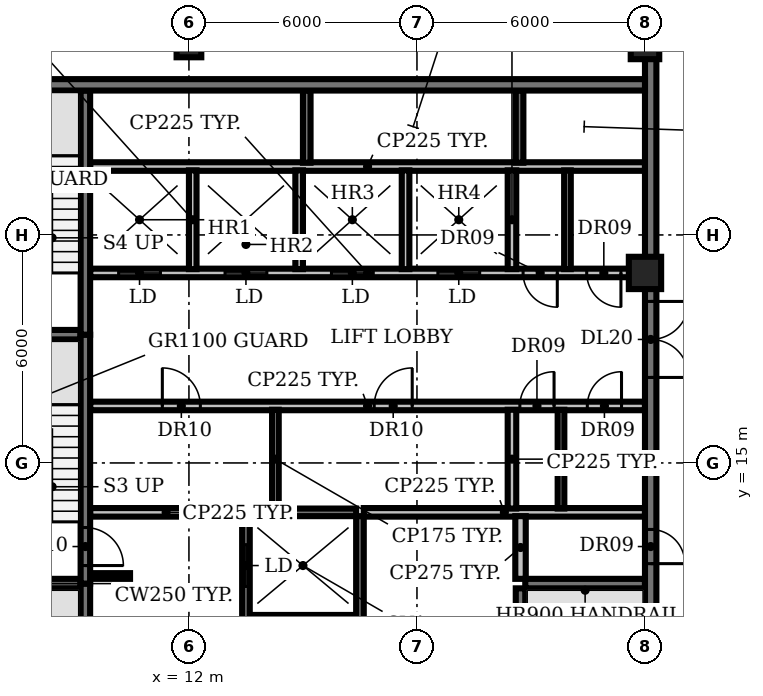
"""IFC4 building model, lengths in metres.
Left out: names, types, materials, properties, quantities, classifications, styles, units other than length and angle.
Written with IfcOpenShell. Run it as: python <this file> out.ifc"""

import sys

from ifc_helpers import new_model, si_unit, direction, frame, frame_2d, origin, origin_2d, place, context, subcontext, project, spatial, rectangle, circle, extrude, element, fill, save


model = new_model("IFC4")
c1 = context("Model", 3, precision=1e-05, world=origin(), true_north=direction((0.0, 1.0)))
c2 = subcontext(c1, "Body", "Model", "MODEL_VIEW")
j1 = project(units=[si_unit("LENGTHUNIT", "METRE"), si_unit("PLANEANGLEUNIT", "RADIAN")], contexts=[c1])
p1 = place(None, origin())
s1 = spatial("IfcSite", under=j1, at=p1, CompositionType="ELEMENT")
p2 = place(p1, origin())
s2 = spatial("IfcBuilding", under=s1, at=p2, CompositionType="ELEMENT")
p3 = place(p2, frame((0.0, 0.0, 297.8)))
s3 = spatial("IfcBuildingStorey", under=s2, at=p3, CompositionType="ELEMENT", Elevation=297.8)
p4 = place(p3, frame((12.0, 26.0, 0.0), z_axis=(0.0, 0.0, 1.0), x_axis=(1.0, 0.0, 0.0)))
e1 = element("IfcColumn", 1, at=p4, inside=s3, PredefinedType="COLUMN", context=c2, shape_type="SweptSolid", body=[
    extrude(rectangle(XDim=0.65, YDim=0.65, at=origin_2d()), origin(), (0.0, 0.0, 1.0), 3.85),
])
p5 = place(p3, frame((24.0, 20.0, 0.0), z_axis=(0.0, 0.0, 1.0), x_axis=(1.0, 0.0, 0.0)))
e2 = element("IfcColumn", 2, at=p5, inside=s3, PredefinedType="COLUMN", context=c2, shape_type="SweptSolid", body=[
    extrude(circle(Radius=0.425, at=origin_2d()), origin(), (0.0, 0.0, 1.0), 3.85),
])
p6 = place(p3, frame((24.0, 26.0, 0.0), z_axis=(0.0, 0.0, 1.0), x_axis=(1.0, 0.0, 0.0)))
e3 = element("IfcColumn", 3, at=p6, inside=s3, PredefinedType="COLUMN", context=c2, shape_type="SweptSolid", body=[
    extrude(rectangle(XDim=0.75, YDim=0.75, at=origin_2d()), origin(), (0.0, 0.0, 1.0), 3.85),
])
p7 = place(p3, frame((13.6, 10.9, 0.0), z_axis=(0.0, 0.0, 1.0), x_axis=(1.0, 0.0, 0.0)))
e4 = element("IfcWall", 4, at=p7, inside=s3, PredefinedType="SHEAR", context=c2, shape_type="SweptSolid", body=[
    extrude(rectangle(XDim=2.8, YDim=0.2, at=frame_2d((1.4, 0.0))), origin(), (0.0, 0.0, 1.0), 3.85),
])
for number, where, z_axis, x_axis in (
    (5, (6.0, 11.825, 0.0), (0.0, 0.0, 1.0), (1.0, 0.0, 0.0)),
    (6, (20.85, 11.825, 0.0), (0.0, 0.0, 1.0), (1.0, 0.0, 0.0)),
):
    element("IfcWall", number, at=place(p3, frame(where, z_axis=z_axis, x_axis=x_axis)), inside=s3, PredefinedType="SHEAR", context=c2, shape_type="SweptSolid", body=[
        extrude(rectangle(XDim=3.15, YDim=0.25, at=frame_2d((1.575, 0.0))), origin(), (0.0, 0.0, 1.0), 3.85),
    ])
p8 = place(p3, frame((9.4, 12.025, 0.0), z_axis=(0.0, 0.0, 1.0), x_axis=(1.0, 0.0, 0.0)))
e7 = element("IfcWall", 7, at=p8, inside=s3, PredefinedType="SHEAR", context=c2, shape_type="SweptSolid", body=[
    extrude(rectangle(XDim=1.05, YDim=0.15, at=frame_2d((0.525, 0.0))), origin(), (0.0, 0.0, 1.0), 3.85),
])
p9 = place(p3, frame((9.4, 13.7, 0.0), z_axis=(0.0, 0.0, 1.0), x_axis=(1.0, 0.0, 0.0)))
e8 = element("IfcWall", 8, at=p9, inside=s3, PredefinedType="PARTITIONING", context=c2, shape_type="SweptSolid", body=[
    extrude(rectangle(XDim=4.0, YDim=0.225, at=frame_2d((2.0, 0.0))), origin(), (0.0, 0.0, 1.0), 3.85),
])
p10 = place(p3, frame((13.6, 13.7, 0.0), z_axis=(0.0, 0.0, 1.0), x_axis=(1.0, 0.0, 0.0)))
e9 = element("IfcWall", 9, at=p10, inside=s3, PredefinedType="SHEAR", context=c2, shape_type="SweptSolid", body=[
    extrude(rectangle(XDim=2.8, YDim=0.2, at=frame_2d((1.4, 0.0))), origin(), (0.0, 0.0, 1.0), 3.85),
])
p11 = place(p3, frame((16.6, 13.7, 0.0), z_axis=(0.0, 0.0, 1.0), x_axis=(1.0, 0.0, 0.0)))
e10 = element("IfcWall", 10, at=p11, inside=s3, PredefinedType="PARTITIONING", context=c2, shape_type="SweptSolid", body=[
    extrude(rectangle(XDim=7.4, YDim=0.225, at=frame_2d((3.7, 0.0))), origin(), (0.0, 0.0, 1.0), 3.85),
])
p12 = place(p3, frame((9.4, 16.5, 0.0), z_axis=(0.0, 0.0, 1.0), x_axis=(1.0, 0.0, 0.0)))
e11 = element("IfcWall", 11, at=p12, inside=s3, PredefinedType="PARTITIONING", context=c2, shape_type="SweptSolid", body=[
    extrude(rectangle(XDim=14.6, YDim=0.225, at=frame_2d((7.3, 0.0))), origin(), (0.0, 0.0, 1.0), 3.85),
])
p13 = place(p12, frame((1.9, 0.0, 0.0)))
e12 = element("IfcOpeningElement", 12, at=p13, cuts=e11, PredefinedType="OPENING", context=c2, shape_type="SweptSolid", body=[
    extrude(rectangle(XDim=1.0, YDim=2.1, at=frame_2d((0.5, 1.05))), frame((0.0, 0.123, 0.0), z_axis=(0.0, -1.0, 0.0), x_axis=(1.0, 0.0, 0.0)), (0.0, 0.0, 1.0), 0.245),
])
p14 = place(p12, frame((7.475, 0.0, 0.0)))
e13 = element("IfcOpeningElement", 13, at=p14, cuts=e11, PredefinedType="OPENING", context=c2, shape_type="SweptSolid", body=[
    extrude(rectangle(XDim=1.0, YDim=2.1, at=frame_2d((0.5, 1.05))), frame((0.0, 0.123, 0.0), z_axis=(0.0, -1.0, 0.0), x_axis=(1.0, 0.0, 0.0)), (0.0, 0.0, 1.0), 0.245),
])
p15 = place(p12, frame((11.308, 0.0, 0.0)))
e14 = element("IfcOpeningElement", 14, at=p15, cuts=e11, PredefinedType="OPENING", context=c2, shape_type="SweptSolid", body=[
    extrude(rectangle(XDim=0.9, YDim=2.1, at=frame_2d((0.45, 1.05))), frame((0.0, 0.123, 0.0), z_axis=(0.0, -1.0, 0.0), x_axis=(1.0, 0.0, 0.0)), (0.0, 0.0, 1.0), 0.245),
])
p16 = place(p12, frame((13.083, 0.0, 0.0)))
e15 = element("IfcOpeningElement", 15, at=p16, cuts=e11, PredefinedType="OPENING", context=c2, shape_type="SweptSolid", body=[
    extrude(rectangle(XDim=0.9, YDim=2.1, at=frame_2d((0.45, 1.05))), frame((0.0, 0.123, 0.0), z_axis=(0.0, -1.0, 0.0), x_axis=(1.0, 0.0, 0.0)), (0.0, 0.0, 1.0), 0.245),
])
p17 = place(p3, frame((6.0, 18.375, 0.0), z_axis=(0.0, 0.0, 1.0), x_axis=(1.0, 0.0, 0.0)))
e16 = element("IfcWall", 16, at=p17, inside=s3, PredefinedType="SHEAR", context=c2, shape_type="SweptSolid", body=[
    extrude(rectangle(XDim=3.15, YDim=0.25, at=frame_2d((1.575, 0.0))), origin(), (0.0, 0.0, 1.0), 3.85),
])
p18 = place(p3, frame((24.0, 20.0, 0.0), z_axis=(0.0, 0.0, 1.0), x_axis=(-1.0, 0.0, 0.0)))
e17 = element("IfcWall", 17, at=p18, inside=s3, PredefinedType="PARTITIONING", context=c2, shape_type="SweptSolid", body=[
    extrude(rectangle(XDim=14.6, YDim=0.225, at=frame_2d((7.3, 0.0))), origin(), (0.0, 0.0, 1.0), 3.85),
])
p19 = place(p18, frame((12.75, 0.0, 0.0)))
e18 = element("IfcOpeningElement", 18, at=p19, cuts=e17, PredefinedType="OPENING", context=c2, shape_type="SweptSolid", body=[
    extrude(rectangle(XDim=1.1, YDim=2.1, at=frame_2d((0.55, 1.05))), frame((0.0, 0.123, 0.0), z_axis=(0.0, -1.0, 0.0), x_axis=(1.0, 0.0, 0.0)), (0.0, 0.0, 1.0), 0.245),
])
p20 = place(p18, frame((9.95, 0.0, 0.0)))
e19 = element("IfcOpeningElement", 19, at=p20, cuts=e17, PredefinedType="OPENING", context=c2, shape_type="SweptSolid", body=[
    extrude(rectangle(XDim=1.1, YDim=2.1, at=frame_2d((0.55, 1.05))), frame((0.0, 0.123, 0.0), z_axis=(0.0, -1.0, 0.0), x_axis=(1.0, 0.0, 0.0)), (0.0, 0.0, 1.0), 0.245),
])
p21 = place(p18, frame((7.15, 0.0, 0.0)))
e20 = element("IfcOpeningElement", 20, at=p21, cuts=e17, PredefinedType="OPENING", context=c2, shape_type="SweptSolid", body=[
    extrude(rectangle(XDim=1.1, YDim=2.1, at=frame_2d((0.55, 1.05))), frame((0.0, 0.123, 0.0), z_axis=(0.0, -1.0, 0.0), x_axis=(1.0, 0.0, 0.0)), (0.0, 0.0, 1.0), 0.245),
])
p22 = place(p18, frame((4.35, 0.0, 0.0)))
e21 = element("IfcOpeningElement", 21, at=p22, cuts=e17, PredefinedType="OPENING", context=c2, shape_type="SweptSolid", body=[
    extrude(rectangle(XDim=1.1, YDim=2.1, at=frame_2d((0.55, 1.05))), frame((0.0, 0.123, 0.0), z_axis=(0.0, -1.0, 0.0), x_axis=(1.0, 0.0, 0.0)), (0.0, 0.0, 1.0), 0.245),
])
p23 = place(p18, frame((2.308, 0.0, 0.0)))
e22 = element("IfcOpeningElement", 22, at=p23, cuts=e17, PredefinedType="OPENING", context=c2, shape_type="SweptSolid", body=[
    extrude(rectangle(XDim=0.9, YDim=2.1, at=frame_2d((0.45, 1.05))), frame((0.0, 0.123, 0.0), z_axis=(0.0, -1.0, 0.0), x_axis=(1.0, 0.0, 0.0)), (0.0, 0.0, 1.0), 0.245),
])
p24 = place(p18, frame((0.633, 0.0, 0.0)))
e23 = element("IfcOpeningElement", 23, at=p24, cuts=e17, PredefinedType="OPENING", context=c2, shape_type="SweptSolid", body=[
    extrude(rectangle(XDim=0.9, YDim=2.1, at=frame_2d((0.45, 1.05))), frame((0.0, 0.123, 0.0), z_axis=(0.0, -1.0, 0.0), x_axis=(1.0, 0.0, 0.0)), (0.0, 0.0, 1.0), 0.245),
])
p25 = place(p3, frame((9.4, 22.8, 0.0), z_axis=(0.0, 0.0, 1.0), x_axis=(1.0, 0.0, 0.0)))
e24 = element("IfcWall", 24, at=p25, inside=s3, PredefinedType="PARTITIONING", context=c2, shape_type="SweptSolid", body=[
    extrude(rectangle(XDim=14.6, YDim=0.225, at=frame_2d((7.3, 0.0))), origin(), (0.0, 0.0, 1.0), 3.85),
])
p26 = place(p3, frame((9.275, 11.825, 0.0), z_axis=(0.0, 0.0, 1.0), x_axis=(0.0, -1.0, 0.0)))
e25 = element("IfcWall", 25, at=p26, inside=s3, PredefinedType="SHEAR", context=c2, shape_type="SweptSolid", body=[
    extrude(rectangle(XDim=6.425, YDim=0.25, at=frame_2d((3.212, 0.0))), origin(), (0.0, 0.0, 1.0), 3.85),
])
p27 = place(p26, frame((5.075, 0.0, 0.0)))
e26 = element("IfcOpeningElement", 26, at=p27, cuts=e25, PredefinedType="OPENING", context=c2, shape_type="SweptSolid", body=[
    extrude(rectangle(XDim=1.0, YDim=2.1, at=frame_2d((0.5, 1.05))), frame((0.0, 0.135, 0.0), z_axis=(0.0, -1.0, 0.0), x_axis=(1.0, 0.0, 0.0)), (0.0, 0.0, 1.0), 0.27),
])
p28 = place(p3, frame((9.275, 18.375, 0.0), z_axis=(0.0, 0.0, 1.0), x_axis=(0.0, -1.0, 0.0)))
e27 = element("IfcWall", 27, at=p28, inside=s3, PredefinedType="SHEAR", context=c2, shape_type="SweptSolid", body=[
    extrude(rectangle(XDim=6.55, YDim=0.25, at=frame_2d((3.275, 0.0))), origin(), (0.0, 0.0, 1.0), 3.85),
])
p29 = place(p28, frame((5.075, 0.0, 0.0)))
e28 = element("IfcOpeningElement", 28, at=p29, cuts=e27, PredefinedType="OPENING", context=c2, shape_type="SweptSolid", body=[
    extrude(rectangle(XDim=1.0, YDim=2.1, at=frame_2d((0.5, 1.05))), frame((0.0, 0.135, 0.0), z_axis=(0.0, -1.0, 0.0), x_axis=(1.0, 0.0, 0.0)), (0.0, 0.0, 1.0), 0.27),
])
p30 = place(p3, frame((9.275, 18.375, 0.0), z_axis=(0.0, 0.0, 1.0), x_axis=(0.0, 1.0, 0.0)))
e29 = element("IfcWall", 29, at=p30, inside=s3, PredefinedType="SHEAR", context=c2, shape_type="SweptSolid", body=[
    extrude(rectangle(XDim=6.425, YDim=0.25, at=frame_2d((3.212, 0.0))), origin(), (0.0, 0.0, 1.0), 3.85),
])
p31 = place(p3, frame((12.1, 20.1, 0.0), z_axis=(0.0, 0.0, 1.0), x_axis=(0.0, 1.0, 0.0)))
e30 = element("IfcWall", 30, at=p31, inside=s3, PredefinedType="SOLIDWALL", context=c2, shape_type="SweptSolid", body=[
    extrude(rectangle(XDim=2.6, YDim=0.2, at=frame_2d((1.3, 0.0))), origin(), (0.0, 0.0, 1.0), 3.85),
])
p32 = place(p3, frame((13.5, 5.4, 0.0), z_axis=(0.0, 0.0, 1.0), x_axis=(0.0, 1.0, 0.0)))
e31 = element("IfcWall", 31, at=p32, inside=s3, PredefinedType="SHEAR", context=c2, shape_type="SweptSolid", body=[
    extrude(rectangle(XDim=8.2, YDim=0.2, at=frame_2d((4.1, 0.0))), origin(), (0.0, 0.0, 1.0), 3.85),
])
p33 = place(p32, frame((0.75, 0.0, 0.0)))
e32 = element("IfcOpeningElement", 32, at=p33, cuts=e31, PredefinedType="OPENING", context=c2, shape_type="SweptSolid", body=[
    extrude(rectangle(XDim=1.1, YDim=2.1, at=frame_2d((0.55, 1.05))), frame((0.0, 0.11, 0.0), z_axis=(0.0, -1.0, 0.0), x_axis=(1.0, 0.0, 0.0)), (0.0, 0.0, 1.0), 0.22),
])
p34 = place(p32, frame((3.55, 0.0, 0.0)))
e33 = element("IfcOpeningElement", 33, at=p34, cuts=e31, PredefinedType="OPENING", context=c2, shape_type="SweptSolid", body=[
    extrude(rectangle(XDim=1.1, YDim=2.1, at=frame_2d((0.55, 1.05))), frame((0.0, 0.11, 0.0), z_axis=(0.0, -1.0, 0.0), x_axis=(1.0, 0.0, 0.0)), (0.0, 0.0, 1.0), 0.22),
])
p35 = place(p32, frame((6.35, 0.0, 0.0)))
e34 = element("IfcOpeningElement", 34, at=p35, cuts=e31, PredefinedType="OPENING", context=c2, shape_type="SweptSolid", body=[
    extrude(rectangle(XDim=1.1, YDim=2.1, at=frame_2d((0.55, 1.05))), frame((0.0, 0.11, 0.0), z_axis=(0.0, -1.0, 0.0), x_axis=(1.0, 0.0, 0.0)), (0.0, 0.0, 1.0), 0.22),
])
p36 = place(p3, frame((14.275, 13.8, 0.0), z_axis=(0.0, 0.0, 1.0), x_axis=(0.0, 1.0, 0.0)))
e35 = element("IfcWall", 35, at=p36, inside=s3, PredefinedType="PARTITIONING", context=c2, shape_type="SweptSolid", body=[
    extrude(rectangle(XDim=2.6, YDim=0.175, at=frame_2d((1.3, 0.0))), origin(), (0.0, 0.0, 1.0), 3.85),
])
p37 = place(p3, frame((14.9, 20.1, 0.0), z_axis=(0.0, 0.0, 1.0), x_axis=(0.0, 1.0, 0.0)))
e36 = element("IfcWall", 36, at=p37, inside=s3, PredefinedType="SOLIDWALL", context=c2, shape_type="SweptSolid", body=[
    extrude(rectangle(XDim=2.6, YDim=0.2, at=frame_2d((1.3, 0.0))), origin(), (0.0, 0.0, 1.0), 3.85),
])
p38 = place(p3, frame((15.1, 22.9, 0.0), z_axis=(0.0, 0.0, 1.0), x_axis=(0.0, 1.0, 0.0)))
e37 = element("IfcWall", 37, at=p38, inside=s3, PredefinedType="SHEAR", context=c2, shape_type="SweptSolid", body=[
    extrude(rectangle(XDim=1.9, YDim=0.2, at=frame_2d((0.95, 0.0))), origin(), (0.0, 0.0, 1.0), 3.85),
])
p39 = place(p3, frame((16.5, 5.4, 0.0), z_axis=(0.0, 0.0, 1.0), x_axis=(0.0, 1.0, 0.0)))
e38 = element("IfcWall", 38, at=p39, inside=s3, PredefinedType="SHEAR", context=c2, shape_type="SweptSolid", body=[
    extrude(rectangle(XDim=8.2, YDim=0.2, at=frame_2d((4.1, 0.0))), origin(), (0.0, 0.0, 1.0), 3.85),
])
p40 = place(p3, frame((17.7, 20.1, 0.0), z_axis=(0.0, 0.0, 1.0), x_axis=(0.0, 1.0, 0.0)))
e39 = element("IfcWall", 39, at=p40, inside=s3, PredefinedType="SOLIDWALL", context=c2, shape_type="SweptSolid", body=[
    extrude(rectangle(XDim=2.6, YDim=0.2, at=frame_2d((1.3, 0.0))), origin(), (0.0, 0.0, 1.0), 3.85),
])
for number, where, z_axis, x_axis in (
    (40, (20.5, 13.8, 0.0), (0.0, 0.0, 1.0), (0.0, 1.0, 0.0)),
    (41, (20.5, 20.1, 0.0), (0.0, 0.0, 1.0), (0.0, 1.0, 0.0)),
):
    element("IfcWall", number, at=place(p3, frame(where, z_axis=z_axis, x_axis=x_axis)), inside=s3, PredefinedType="PARTITIONING", context=c2, shape_type="SweptSolid", body=[
        extrude(rectangle(XDim=2.6, YDim=0.225, at=frame_2d((1.3, 0.0))), origin(), (0.0, 0.0, 1.0), 3.85),
    ])
p41 = place(p3, frame((20.7, 22.9, 0.0), z_axis=(0.0, 0.0, 1.0), x_axis=(0.0, 1.0, 0.0)))
e42 = element("IfcWall", 42, at=p41, inside=s3, PredefinedType="SHEAR", context=c2, shape_type="SweptSolid", body=[
    extrude(rectangle(XDim=1.9, YDim=0.2, at=frame_2d((0.95, 0.0))), origin(), (0.0, 0.0, 1.0), 3.85),
])
p42 = place(p3, frame((20.725, 5.4, 0.0), z_axis=(0.0, 0.0, 1.0), x_axis=(0.0, 1.0, 0.0)))
e43 = element("IfcWall", 43, at=p42, inside=s3, PredefinedType="SHEAR", context=c2, shape_type="SweptSolid", body=[
    extrude(rectangle(XDim=6.3, YDim=0.25, at=frame_2d((3.15, 0.0))), origin(), (0.0, 0.0, 1.0), 3.85),
])
p43 = place(p3, frame((20.725, 11.95, 0.0), z_axis=(0.0, 0.0, 1.0), x_axis=(0.0, 1.0, 0.0)))
e44 = element("IfcWall", 44, at=p43, inside=s3, PredefinedType="PARTITIONING", context=c2, shape_type="SweptSolid", body=[
    extrude(rectangle(XDim=1.65, YDim=0.275, at=frame_2d((0.825, 0.0))), origin(), (0.0, 0.0, 1.0), 3.85),
])
for number, where, z_axis, x_axis in (
    (45, (21.79, 13.8, 0.0), (0.0, 0.0, 1.0), (0.0, 1.0, 0.0)),
    (46, (21.96, 20.1, 0.0), (0.0, 0.0, 1.0), (0.0, 1.0, 0.0)),
):
    element("IfcWall", number, at=place(p3, frame(where, z_axis=z_axis, x_axis=x_axis)), inside=s3, PredefinedType="PARTITIONING", context=c2, shape_type="SweptSolid", body=[
        extrude(rectangle(XDim=2.6, YDim=0.175, at=frame_2d((1.3, 0.0))), origin(), (0.0, 0.0, 1.0), 3.85),
    ])
p44 = place(p3, frame((24.15, 25.655, 0.0), z_axis=(0.0, 0.0, 1.0), x_axis=(0.0, -1.0, 0.0)))
e47 = element("IfcWall", 47, at=p44, inside=s3, PredefinedType="SHEAR", context=c2, shape_type="SweptSolid", body=[
    extrude(rectangle(XDim=20.555, YDim=0.3, at=frame_2d((10.277, 0.0))), origin(), (0.0, 0.0, 1.0), 3.85),
])
p45 = place(p44, frame((18.505, 0.0, 0.0)))
e48 = element("IfcOpeningElement", 48, at=p45, cuts=e47, PredefinedType="OPENING", context=c2, shape_type="SweptSolid", body=[
    extrude(rectangle(XDim=1.5, YDim=2.1, at=frame_2d((0.75, 1.05))), frame((0.0, 0.16, 0.0), z_axis=(0.0, -1.0, 0.0), x_axis=(1.0, 0.0, 0.0)), (0.0, 0.0, 1.0), 0.32),
])
p46 = place(p44, frame((12.405, 0.0, 0.0)))
e49 = element("IfcOpeningElement", 49, at=p46, cuts=e47, PredefinedType="OPENING", context=c2, shape_type="SweptSolid", body=[
    extrude(rectangle(XDim=0.9, YDim=2.1, at=frame_2d((0.45, 1.05))), frame((0.0, 0.16, 0.0), z_axis=(0.0, -1.0, 0.0), x_axis=(1.0, 0.0, 0.0)), (0.0, 0.0, 1.0), 0.32),
])
p47 = place(p44, frame((6.405, 0.0, 0.0)))
e50 = element("IfcOpeningElement", 50, at=p47, cuts=e47, PredefinedType="OPENING", context=c2, shape_type="SweptSolid", body=[
    extrude(rectangle(XDim=2.0, YDim=2.1, at=frame_2d((1.0, 1.05))), frame((0.0, 0.16, 0.0), z_axis=(0.0, -1.0, 0.0), x_axis=(1.0, 0.0, 0.0)), (0.0, 0.0, 1.0), 0.32),
])
p48 = place(p3, frame((6.0, 24.95, 0.0), z_axis=(0.0, 0.0, 1.0), x_axis=(1.0, 0.0, 0.0)))
e51 = element("IfcWall", 51, at=p48, inside=s3, PredefinedType="SHEAR", context=c2, shape_type="SweptSolid", body=[
    extrude(rectangle(XDim=18.0, YDim=0.3, at=frame_2d((9.0, 0.0))), origin(), (0.0, 0.0, 1.0), 3.85),
])
p49 = place(p13, origin())
e52 = element("IfcDoor", 52, at=p49, inside=s3, OperationType="SINGLE_SWING_LEFT", PredefinedType="DOOR", context=c2, shape_type="SweptSolid", body=[
    extrude(rectangle(XDim=1.0, YDim=2.1, at=frame_2d((0.5, 1.05))), frame((0.0, 0.025, 0.0), z_axis=(0.0, -1.0, 0.0), x_axis=(1.0, 0.0, 0.0)), (0.0, 0.0, 1.0), 0.05),
])
fill(e12, e52)
p50 = place(p14, origin())
e53 = element("IfcDoor", 53, at=p50, inside=s3, OperationType="SINGLE_SWING_RIGHT", PredefinedType="DOOR", context=c2, shape_type="SweptSolid", body=[
    extrude(rectangle(XDim=1.0, YDim=2.1, at=frame_2d((0.5, 1.05))), frame((0.0, 0.025, 0.0), z_axis=(0.0, -1.0, 0.0), x_axis=(1.0, 0.0, 0.0)), (0.0, 0.0, 1.0), 0.05),
])
fill(e13, e53)
p51 = place(p15, origin())
e54 = element("IfcDoor", 54, at=p51, inside=s3, OperationType="SINGLE_SWING_RIGHT", PredefinedType="DOOR", context=c2, shape_type="SweptSolid", body=[
    extrude(rectangle(XDim=0.9, YDim=2.1, at=frame_2d((0.45, 1.05))), frame((0.0, 0.025, 0.0), z_axis=(0.0, -1.0, 0.0), x_axis=(1.0, 0.0, 0.0)), (0.0, 0.0, 1.0), 0.05),
])
fill(e14, e54)
p52 = place(p16, origin())
e55 = element("IfcDoor", 55, at=p52, inside=s3, OperationType="SINGLE_SWING_RIGHT", PredefinedType="DOOR", context=c2, shape_type="SweptSolid", body=[
    extrude(rectangle(XDim=0.9, YDim=2.1, at=frame_2d((0.45, 1.05))), frame((0.0, 0.025, 0.0), z_axis=(0.0, -1.0, 0.0), x_axis=(1.0, 0.0, 0.0)), (0.0, 0.0, 1.0), 0.05),
])
fill(e15, e55)
p53 = place(p19, origin())
e56 = element("IfcDoor", 56, at=p53, inside=s3, OperationType="DOUBLE_DOOR_SLIDING", PredefinedType="DOOR", context=c2, shape_type="SweptSolid", body=[
    extrude(rectangle(XDim=1.1, YDim=2.1, at=frame_2d((0.55, 1.05))), frame((0.0, 0.025, 0.0), z_axis=(0.0, -1.0, 0.0), x_axis=(1.0, 0.0, 0.0)), (0.0, 0.0, 1.0), 0.05),
])
fill(e18, e56)
p54 = place(p20, origin())
e57 = element("IfcDoor", 57, at=p54, inside=s3, OperationType="DOUBLE_DOOR_SLIDING", PredefinedType="DOOR", context=c2, shape_type="SweptSolid", body=[
    extrude(rectangle(XDim=1.1, YDim=2.1, at=frame_2d((0.55, 1.05))), frame((0.0, 0.025, 0.0), z_axis=(0.0, -1.0, 0.0), x_axis=(1.0, 0.0, 0.0)), (0.0, 0.0, 1.0), 0.05),
])
fill(e19, e57)
p55 = place(p21, origin())
e58 = element("IfcDoor", 58, at=p55, inside=s3, OperationType="DOUBLE_DOOR_SLIDING", PredefinedType="DOOR", context=c2, shape_type="SweptSolid", body=[
    extrude(rectangle(XDim=1.1, YDim=2.1, at=frame_2d((0.55, 1.05))), frame((0.0, 0.025, 0.0), z_axis=(0.0, -1.0, 0.0), x_axis=(1.0, 0.0, 0.0)), (0.0, 0.0, 1.0), 0.05),
])
fill(e20, e58)
p56 = place(p22, origin())
e59 = element("IfcDoor", 59, at=p56, inside=s3, OperationType="DOUBLE_DOOR_SLIDING", PredefinedType="DOOR", context=c2, shape_type="SweptSolid", body=[
    extrude(rectangle(XDim=1.1, YDim=2.1, at=frame_2d((0.55, 1.05))), frame((0.0, 0.025, 0.0), z_axis=(0.0, -1.0, 0.0), x_axis=(1.0, 0.0, 0.0)), (0.0, 0.0, 1.0), 0.05),
])
fill(e21, e59)
p57 = place(p23, origin())
e60 = element("IfcDoor", 60, at=p57, inside=s3, OperationType="SINGLE_SWING_LEFT", PredefinedType="DOOR", context=c2, shape_type="SweptSolid", body=[
    extrude(rectangle(XDim=0.9, YDim=2.1, at=frame_2d((0.45, 1.05))), frame((0.0, 0.025, 0.0), z_axis=(0.0, -1.0, 0.0), x_axis=(1.0, 0.0, 0.0)), (0.0, 0.0, 1.0), 0.05),
])
fill(e22, e60)
p58 = place(p24, origin())
e61 = element("IfcDoor", 61, at=p58, inside=s3, OperationType="SINGLE_SWING_LEFT", PredefinedType="DOOR", context=c2, shape_type="SweptSolid", body=[
    extrude(rectangle(XDim=0.9, YDim=2.1, at=frame_2d((0.45, 1.05))), frame((0.0, 0.025, 0.0), z_axis=(0.0, -1.0, 0.0), x_axis=(1.0, 0.0, 0.0)), (0.0, 0.0, 1.0), 0.05),
])
fill(e23, e61)
p59 = place(p29, origin())
e62 = element("IfcDoor", 62, at=p59, inside=s3, OperationType="SINGLE_SWING_RIGHT", PredefinedType="DOOR", context=c2, shape_type="SweptSolid", body=[
    extrude(rectangle(XDim=1.0, YDim=2.1, at=frame_2d((0.5, 1.05))), frame((0.0, 0.025, 0.0), z_axis=(0.0, -1.0, 0.0), x_axis=(1.0, 0.0, 0.0)), (0.0, 0.0, 1.0), 0.05),
])
fill(e28, e62)
p60 = place(p35, origin())
e63 = element("IfcDoor", 63, at=p60, inside=s3, OperationType="DOUBLE_DOOR_SLIDING", PredefinedType="DOOR", context=c2, shape_type="SweptSolid", body=[
    extrude(rectangle(XDim=1.1, YDim=2.1, at=frame_2d((0.55, 1.05))), frame((0.0, 0.025, 0.0), z_axis=(0.0, -1.0, 0.0), x_axis=(1.0, 0.0, 0.0)), (0.0, 0.0, 1.0), 0.05),
])
fill(e34, e63)
p61 = place(p46, origin())
e64 = element("IfcDoor", 64, at=p61, inside=s3, OperationType="SINGLE_SWING_RIGHT", PredefinedType="DOOR", context=c2, shape_type="SweptSolid", body=[
    extrude(rectangle(XDim=0.9, YDim=2.1, at=frame_2d((0.45, 1.05))), frame((0.0, 0.025, 0.0), z_axis=(0.0, -1.0, 0.0), x_axis=(1.0, 0.0, 0.0)), (0.0, 0.0, 1.0), 0.05),
])
fill(e49, e64)
p62 = place(p47, origin())
e65 = element("IfcDoor", 65, at=p62, inside=s3, OperationType="DOUBLE_DOOR_SINGLE_SWING", PredefinedType="DOOR", context=c2, shape_type="SweptSolid", body=[
    extrude(rectangle(XDim=2.0, YDim=2.1, at=frame_2d((1.0, 1.05))), frame((0.0, 0.025, 0.0), z_axis=(0.0, -1.0, 0.0), x_axis=(1.0, 0.0, 0.0)), (0.0, 0.0, 1.0), 0.05),
])
fill(e50, e65)
save(model, sys.argv[1])
